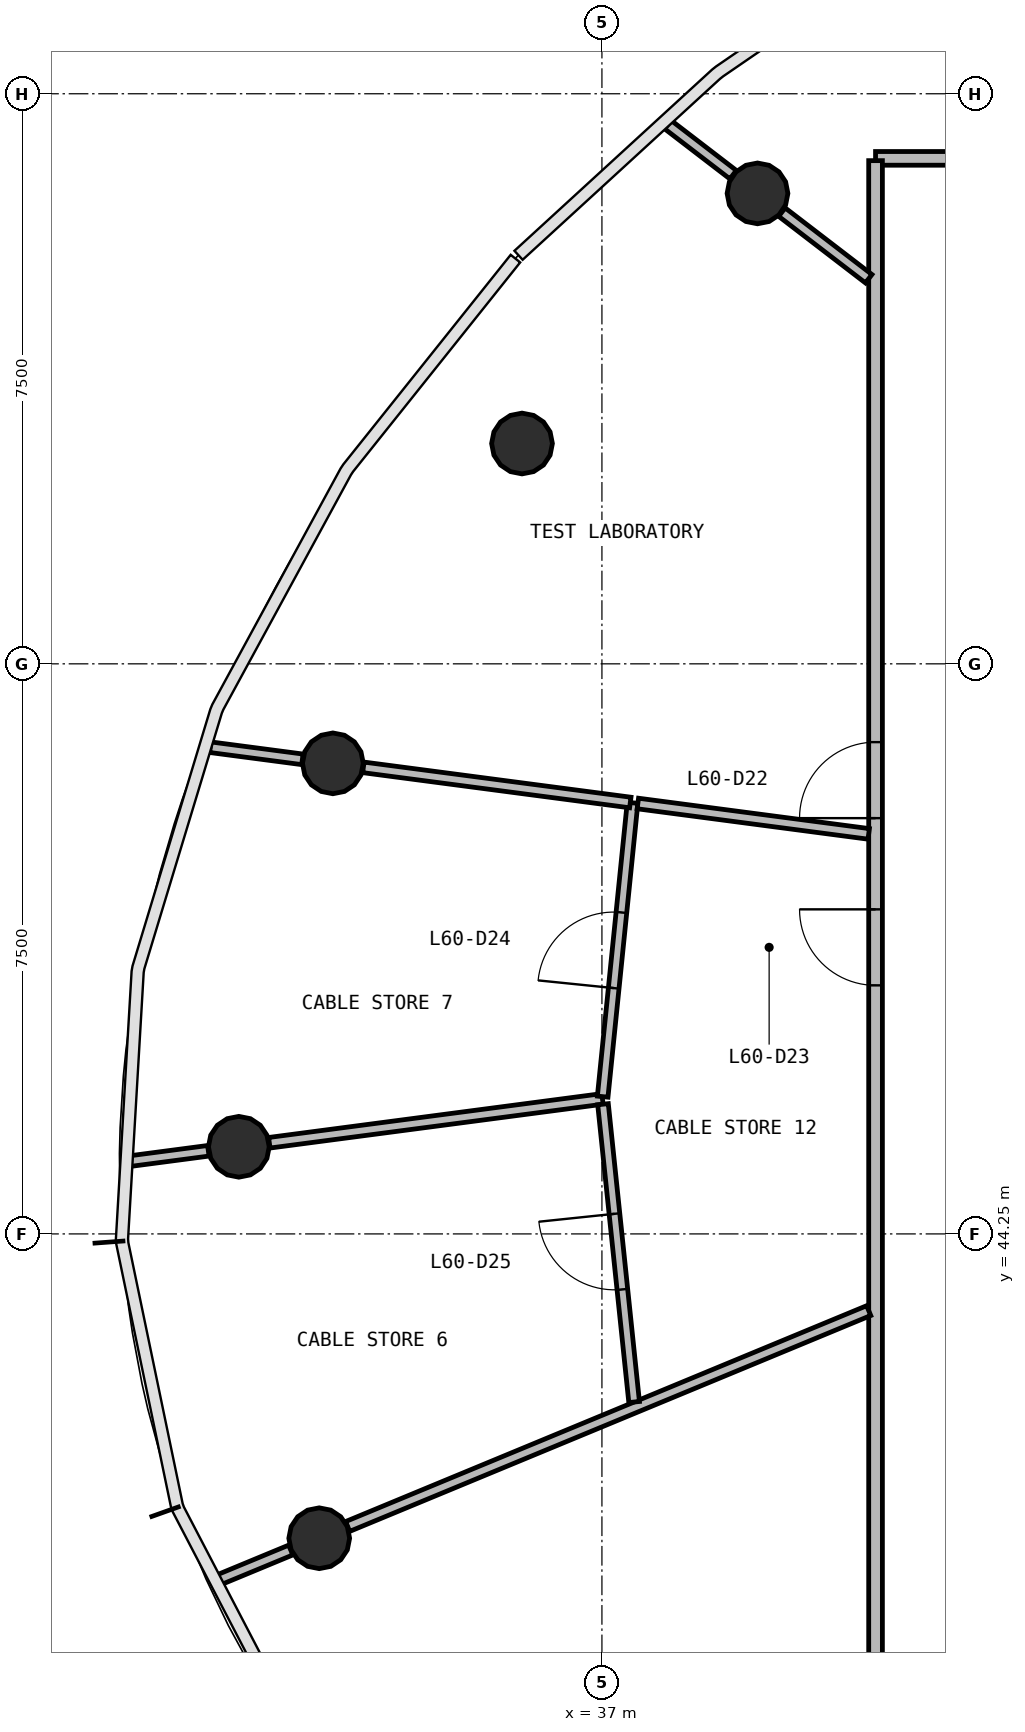
"""IFC4 building model, lengths in metres.
Left out: names, types, materials, properties, quantities, classifications, styles, units other than length and angle.
Written with IfcOpenShell. Run it as: python <this file> out.ifc"""

import sys

from ifc_helpers import new_model, si_unit, direction, frame, frame_2d, origin, origin_2d, place, context, subcontext, project, spatial, rectangle, circle, extrude, source, transform, mapped, element, fill, save


model = new_model("IFC4")
c1 = context("Model", 3, precision=1e-05, world=origin(), true_north=direction((0.0, 1.0)))
c2 = subcontext(c1, "Body", "Model", "MODEL_VIEW")
j1 = project(units=[si_unit("LENGTHUNIT", "METRE"), si_unit("PLANEANGLEUNIT", "RADIAN")], contexts=[c1])
p1 = place(None, origin())
s1 = spatial("IfcSite", under=j1, at=p1, CompositionType="ELEMENT")
p2 = place(p1, origin())
s2 = spatial("IfcBuilding", under=s1, at=p2, CompositionType="ELEMENT")
p3 = place(p2, frame((0.0, 0.0, 246.2)))
s3 = spatial("IfcBuildingStorey", under=s2, at=p3, CompositionType="ELEMENT", Elevation=246.2)
m1 = source(origin(), c2, "Body", "SweptSolid", [
    extrude(circle(Radius=0.4, at=origin_2d()), origin(), (0.0, 0.0, 1.0), 3.9),
])
for number, where, z_axis, x_axis in (
    (1, (39.047, 57.939, 0.0), (0.0, 0.0, 1.0), (1.0, 0.0, 0.0)),
    (2, (35.948, 54.649, 0.0), (0.0, 0.0, 1.0), (1.0, 0.0, 0.0)),
    (3, (33.46, 50.441, 0.0), (0.0, 0.0, 1.0), (1.0, 0.0, 0.0)),
    (4, (32.223, 45.396, 0.0), (0.0, 0.0, 1.0), (1.0, 0.0, 0.0)),
    (5, (33.281, 40.246, 0.0), (0.0, 0.0, 1.0), (1.0, 0.0, 0.0)),
):
    element("IfcColumn", number, at=place(p3, frame(where, z_axis=z_axis, x_axis=x_axis)), inside=s3, PredefinedType="COLUMN", context=c2, shape_type="MappedRepresentation", body=[
        mapped(m1, transform((0.0, 0.0, 0.0), scale=1.0)),
    ])
p4 = place(p3, frame((40.6, 58.4, 0.0), z_axis=(0.0, 0.0, 1.0), x_axis=(1.0, 0.0, 0.0)))
e6 = element("IfcWall", 6, at=p4, inside=s3, PredefinedType="PARTITIONING", context=c2, shape_type="SweptSolid", body=[
    extrude(rectangle(XDim=22.8, YDim=0.18, at=frame_2d((11.4, 0.0))), origin(), (0.0, 0.0, 1.0), 2.88),
])
p5 = place(p4, frame((10.85, 0.0, 0.0)))
e7 = element("IfcOpeningElement", 7, at=p5, cuts=e6, PredefinedType="OPENING", context=c2, shape_type="SweptSolid", body=[
    extrude(rectangle(XDim=0.9, YDim=2.1, at=frame_2d((0.45, 1.05))), frame((0.0, 0.1, 0.0), z_axis=(0.0, -1.0, 0.0), x_axis=(1.0, 0.0, 0.0)), (0.0, 0.0, 1.0), 0.2),
])
p6 = place(p4, frame((8.85, 0.0, 0.0)))
e8 = element("IfcOpeningElement", 8, at=p6, cuts=e6, PredefinedType="OPENING", context=c2, shape_type="SweptSolid", body=[
    extrude(rectangle(XDim=0.9, YDim=2.1, at=frame_2d((0.45, 1.05))), frame((0.0, 0.1, 0.0), z_axis=(0.0, -1.0, 0.0), x_axis=(1.0, 0.0, 0.0)), (0.0, 0.0, 1.0), 0.2),
])
p7 = place(p4, frame((5.75, 0.0, 0.0)))
e9 = element("IfcOpeningElement", 9, at=p7, cuts=e6, PredefinedType="OPENING", context=c2, shape_type="SweptSolid", body=[
    extrude(rectangle(XDim=1.0, YDim=2.1, at=frame_2d((0.5, 1.05))), frame((0.0, 0.1, 0.0), z_axis=(0.0, -1.0, 0.0), x_axis=(1.0, 0.0, 0.0)), (0.0, 0.0, 1.0), 0.2),
])
p8 = place(p4, frame((16.15, 0.0, 0.0)))
e10 = element("IfcOpeningElement", 10, at=p8, cuts=e6, PredefinedType="OPENING", context=c2, shape_type="SweptSolid", body=[
    extrude(rectangle(XDim=1.0, YDim=2.1, at=frame_2d((0.5, 1.05))), frame((0.0, 0.1, 0.0), z_axis=(0.0, -1.0, 0.0), x_axis=(1.0, 0.0, 0.0)), (0.0, 0.0, 1.0), 0.2),
])
p9 = place(p4, frame((12.95, 0.0, 0.0)))
e11 = element("IfcOpeningElement", 11, at=p9, cuts=e6, PredefinedType="OPENING", context=c2, shape_type="SweptSolid", body=[
    extrude(rectangle(XDim=1.0, YDim=2.1, at=frame_2d((0.5, 1.05))), frame((0.0, 0.1, 0.0), z_axis=(0.0, -1.0, 0.0), x_axis=(1.0, 0.0, 0.0)), (0.0, 0.0, 1.0), 0.2),
])
p10 = place(p3, frame((40.6, 37.63, 0.0), z_axis=(0.0, 0.0, 1.0), x_axis=(0.0, 1.0, 0.0)))
e12 = element("IfcWall", 12, at=p10, inside=s3, PredefinedType="PARTITIONING", context=c2, shape_type="SweptSolid", body=[
    extrude(rectangle(XDim=20.74, YDim=0.18, at=frame_2d((10.37, 0.0))), origin(), (0.0, 0.0, 1.0), 2.88),
])
p11 = place(p10, frame((12.09, 0.0, 0.0)))
e13 = element("IfcOpeningElement", 13, at=p11, cuts=e12, PredefinedType="OPENING", context=c2, shape_type="SweptSolid", body=[
    extrude(rectangle(XDim=1.0, YDim=2.1, at=frame_2d((0.5, 1.05))), frame((0.0, 0.1, 0.0), z_axis=(0.0, -1.0, 0.0), x_axis=(1.0, 0.0, 0.0)), (0.0, 0.0, 1.0), 0.2),
])
p12 = place(p10, frame((9.89, 0.0, 0.0)))
e14 = element("IfcOpeningElement", 14, at=p12, cuts=e12, PredefinedType="OPENING", context=c2, shape_type="SweptSolid", body=[
    extrude(rectangle(XDim=1.0, YDim=2.1, at=frame_2d((0.5, 1.05))), frame((0.0, 0.1, 0.0), z_axis=(0.0, -1.0, 0.0), x_axis=(1.0, 0.0, 0.0)), (0.0, 0.0, 1.0), 0.2),
])
p13 = place(p3, frame((33.655, 40.401, 0.0), z_axis=(0.0, 0.0, 1.0), x_axis=(0.92388089155, 0.38268015134, 0.0)))
e15 = element("IfcWall", 15, at=p13, inside=s3, PredefinedType="PARTITIONING", context=c2, shape_type="SweptSolid", body=[
    extrude(rectangle(XDim=7.42, YDim=0.14, at=frame_2d((3.71, 0.0))), origin(), (0.0, 0.0, 1.0), 2.88),
])
p14 = place(p3, frame((37.007, 46.026, 0.0), z_axis=(0.0, 0.0, 1.0), x_axis=(-0.991448843636, -0.130495940373, 0.0)))
e16 = element("IfcWall", 16, at=p14, inside=s3, PredefinedType="PARTITIONING", context=c2, shape_type="SweptSolid", body=[
    extrude(rectangle(XDim=4.421, YDim=0.14, at=frame_2d((2.21, 0.0))), origin(), (0.0, 0.0, 1.0), 2.88),
])
p15 = place(p3, frame((37.424, 42.038, 0.0), z_axis=(0.0, 0.0, 1.0), x_axis=(-0.10392025581, 0.994585632529, 0.0)))
e17 = element("IfcWall", 17, at=p15, inside=s3, PredefinedType="PARTITIONING", context=c2, shape_type="SweptSolid", body=[
    extrude(rectangle(XDim=3.94, YDim=0.14, at=frame_2d((1.97, 0.0))), origin(), (0.0, 0.0, 1.0), 2.88),
])
p16 = place(p15, frame((1.49, 0.0, 0.0)))
e18 = element("IfcOpeningElement", 18, at=p16, cuts=e17, PredefinedType="OPENING", context=c2, shape_type="SweptSolid", body=[
    extrude(rectangle(XDim=1.0, YDim=2.1, at=frame_2d((0.5, 1.05))), frame((0.0, 0.08, 0.0), z_axis=(0.0, -1.0, 0.0), x_axis=(1.0, 0.0, 0.0)), (0.0, 0.0, 1.0), 0.16),
])
p17 = place(p3, frame((37.01, 46.056, 0.0), z_axis=(0.0, 0.0, 1.0), x_axis=(0.101220533305, 0.994864012636, 0.0)))
e19 = element("IfcWall", 19, at=p17, inside=s3, PredefinedType="PARTITIONING", context=c2, shape_type="SweptSolid", body=[
    extrude(rectangle(XDim=3.886, YDim=0.14, at=frame_2d((1.943, 0.0))), origin(), (0.0, 0.0, 1.0), 2.88),
])
p18 = place(p17, frame((1.436, 0.0, 0.0)))
e20 = element("IfcOpeningElement", 20, at=p18, cuts=e19, PredefinedType="OPENING", context=c2, shape_type="SweptSolid", body=[
    extrude(rectangle(XDim=1.0, YDim=2.1, at=frame_2d((0.5, 1.05))), frame((0.0, 0.08, 0.0), z_axis=(0.0, -1.0, 0.0), x_axis=(1.0, 0.0, 0.0)), (0.0, 0.0, 1.0), 0.16),
])
p19 = place(p3, frame((37.373, 49.926, 0.0), z_axis=(0.0, 0.0, 1.0), x_axis=(-0.991444440683, 0.130529387644, 0.0)))
e21 = element("IfcWall", 21, at=p19, inside=s3, PredefinedType="PARTITIONING", context=c2, shape_type="SweptSolid", body=[
    extrude(rectangle(XDim=3.542, YDim=0.14, at=frame_2d((1.771, 0.0))), origin(), (0.0, 0.0, 1.0), 2.88),
])
p20 = place(p3, frame((40.51, 49.513, 0.0), z_axis=(0.0, 0.0, 1.0), x_axis=(-0.99144507148, 0.130524596294, 0.0)))
e22 = element("IfcWall", 22, at=p20, inside=s3, PredefinedType="PARTITIONING", context=c2, shape_type="SweptSolid", body=[
    extrude(rectangle(XDim=3.064, YDim=0.14, at=frame_2d((1.532, 0.0))), origin(), (0.0, 0.0, 1.0), 2.88),
])
p21 = place(p3, frame((40.51, 56.817, 0.0), z_axis=(0.0, 0.0, 1.0), x_axis=(-0.793316945216, 0.608808857059, 0.0)))
e23 = element("IfcWall", 23, at=p21, inside=s3, PredefinedType="PARTITIONING", context=c2, shape_type="SweptSolid", body=[
    extrude(rectangle(XDim=1.44, YDim=0.14, at=frame_2d((0.72, 0.0))), origin(), (0.0, 0.0, 1.0), 2.88),
])
p22 = place(p3, frame((33.059, 50.494, 0.0), z_axis=(0.0, 0.0, 1.0), x_axis=(-0.991435934833, 0.130593978123, 0.0)))
e24 = element("IfcWall", 24, at=p22, inside=s3, PredefinedType="PARTITIONING", context=c2, shape_type="SweptSolid", body=[
    extrude(rectangle(XDim=1.223, YDim=0.14, at=frame_2d((0.611, 0.0))), origin(), (0.0, 0.0, 1.0), 2.88),
])
p23 = place(p3, frame((38.726, 58.186, 0.0), z_axis=(0.0, 0.0, 1.0), x_axis=(-0.793403043082, 0.608696649596, 0.0)))
e25 = element("IfcWall", 25, at=p23, inside=s3, PredefinedType="PARTITIONING", context=c2, shape_type="SweptSolid", body=[
    extrude(rectangle(XDim=1.083, YDim=0.14, at=frame_2d((0.541, 0.0))), origin(), (0.0, 0.0, 1.0), 2.88),
])
p24 = place(p3, frame((31.822, 45.344, 0.0), z_axis=(0.0, 0.0, 1.0), x_axis=(-0.991430180557, -0.130637655674, 0.0)))
e26 = element("IfcWall", 26, at=p24, inside=s3, PredefinedType="PARTITIONING", context=c2, shape_type="SweptSolid", body=[
    extrude(rectangle(XDim=1.069, YDim=0.14, at=frame_2d((0.535, 0.0))), origin(), (0.0, 0.0, 1.0), 2.88),
])
p25 = place(p3, frame((32.906, 40.091, 0.0), z_axis=(0.0, 0.0, 1.0), x_axis=(-0.92391047829, -0.382608714102, 0.0)))
e27 = element("IfcWall", 27, at=p25, inside=s3, PredefinedType="PARTITIONING", context=c2, shape_type="SweptSolid", body=[
    extrude(rectangle(XDim=1.063, YDim=0.14, at=frame_2d((0.531, 0.0))), origin(), (0.0, 0.0, 1.0), 2.88),
])
m2 = source(origin(), c2, "Body", "SweptSolid", [
    extrude(rectangle(XDim=1.0, YDim=2.1, at=frame_2d((0.5, 1.05))), frame((0.0, 0.025, 0.0), z_axis=(0.0, -1.0, 0.0), x_axis=(1.0, 0.0, 0.0)), (0.0, 0.0, 1.0), 0.05),
])
p26 = place(p11, origin())
e28 = element("IfcDoor", 28, at=p26, inside=s3, OperationType="SINGLE_SWING_LEFT", PredefinedType="DOOR", context=c2, shape_type="MappedRepresentation", body=[
    mapped(m2, transform((0.0, 0.0, 0.0), scale=1.0)),
])
fill(e13, e28)
p27 = place(p12, origin())
e29 = element("IfcDoor", 29, at=p27, inside=s3, OperationType="SINGLE_SWING_RIGHT", PredefinedType="DOOR", context=c2, shape_type="MappedRepresentation", body=[
    mapped(m2, transform((0.0, 0.0, 0.0), scale=1.0)),
])
fill(e14, e29)
p28 = place(p18, origin())
e30 = element("IfcDoor", 30, at=p28, inside=s3, OperationType="SINGLE_SWING_LEFT", PredefinedType="DOOR", context=c2, shape_type="MappedRepresentation", body=[
    mapped(m2, transform((0.0, 0.0, 0.0), scale=1.0)),
])
fill(e20, e30)
p29 = place(p16, origin())
e31 = element("IfcDoor", 31, at=p29, inside=s3, OperationType="SINGLE_SWING_RIGHT", PredefinedType="DOOR", context=c2, shape_type="MappedRepresentation", body=[
    mapped(m2, transform((0.0, 0.0, 0.0), scale=1.0)),
])
fill(e18, e31)
save(model, sys.argv[1])
